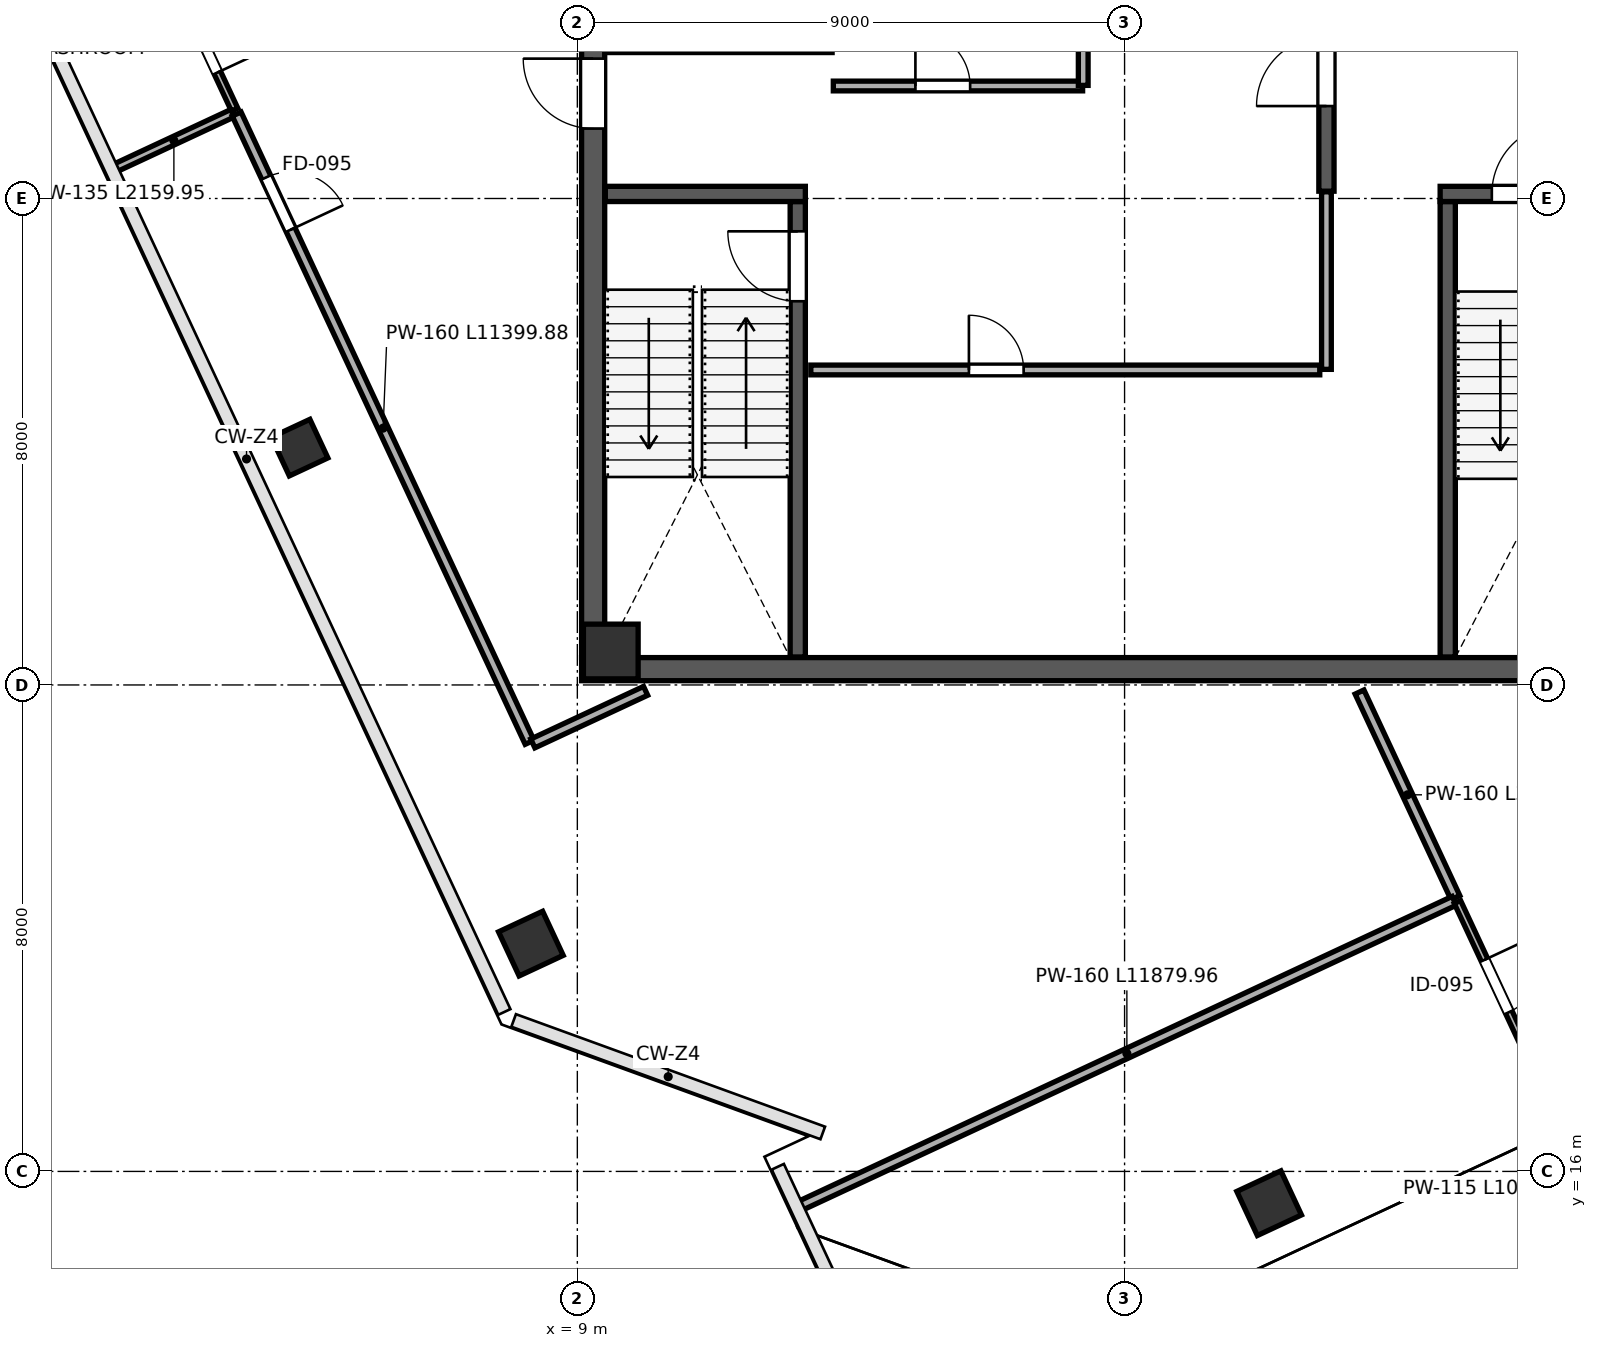
"""IFC4 building model, lengths in metres.
Left out: names, types, materials, properties, quantities, classifications, styles, units other than length and angle.
Written with IfcOpenShell. Run it as: python <this file> out.ifc"""

import sys

from ifc_helpers import new_model, si_unit, direction, frame, frame_2d, origin, origin_2d, place, context, subcontext, project, spatial, rectangle, extrude, source, transform, mapped, element, fill, save


model = new_model("IFC4")
c1 = context("Model", 3, precision=1e-05, world=origin(), true_north=direction((0.0, 1.0)))
c2 = subcontext(c1, "Body", "Model", "MODEL_VIEW")
j1 = project(units=[si_unit("LENGTHUNIT", "METRE"), si_unit("PLANEANGLEUNIT", "RADIAN")], contexts=[c1])
p1 = place(None, origin())
s1 = spatial("IfcSite", under=j1, at=p1, CompositionType="ELEMENT")
p2 = place(p1, origin())
s2 = spatial("IfcBuilding", under=s1, at=p2, CompositionType="ELEMENT")
p3 = place(p2, frame((0.0, 0.0, 340.8)))
s3 = spatial("IfcBuildingStorey", under=s2, at=p3, CompositionType="ELEMENT", Elevation=340.8)
m1 = source(origin(), c2, "Body", "SweptSolid", [
    extrude(rectangle(XDim=0.9, YDim=0.9, at=origin_2d()), origin(), (0.0, 0.0, 1.0), 4.198),
])
p4 = place(p3, frame((9.55, 24.55, 0.001), z_axis=(0.0, 0.0, 1.0), x_axis=(1.0, 0.0, 0.0)))
e1 = element("IfcColumn", 1, at=p4, inside=s3, PredefinedType="COLUMN", context=c2, shape_type="MappedRepresentation", body=[
    mapped(m1, transform((0.0, 0.0, 0.0), scale=1.0)),
])
m2 = source(origin(), c2, "Body", "SweptSolid", [
    extrude(rectangle(XDim=0.7, YDim=0.7, at=origin_2d()), origin(), (0.0, 0.0, 1.0), 4.198),
])
p5 = place(p3, frame((4.432, 27.903, 0.001), z_axis=(0.0, 0.0, 1.0), x_axis=(-0.422618261741, 0.906307787037, 0.0)))
e2 = element("IfcColumn", 2, at=p5, inside=s3, PredefinedType="COLUMN", context=c2, shape_type="MappedRepresentation", body=[
    mapped(m2, transform((0.0, 0.0, 0.0), scale=1.0)),
])
m3 = source(origin(), c2, "Body", "SweptSolid", [
    extrude(rectangle(XDim=0.8, YDim=0.8, at=origin_2d()), origin(), (0.0, 0.0, 1.0), 4.198),
])
for number, where, z_axis, x_axis in (
    (3, (8.236, 19.746, 0.001), (0.0, 0.0, 1.0), (-0.423, 0.906, 0.0)),
    (4, (20.377, 15.478, 0.001), (0.0, 0.0, 1.0), (-0.423, 0.906, 0.0)),
):
    element("IfcColumn", number, at=place(p3, frame(where, z_axis=z_axis, x_axis=x_axis)), inside=s3, PredefinedType="COLUMN", context=c2, shape_type="MappedRepresentation", body=[
        mapped(m3, transform((0.0, 0.0, 0.0), scale=1.0)),
    ])
p6 = place(p3, frame((9.26, 24.45, 0.0), z_axis=(0.0, 0.0, 1.0), x_axis=(0.0, 1.0, 0.0)))
e5 = element("IfcWall", 5, at=p6, inside=s3, PredefinedType="SHEAR", context=c2, shape_type="SweptSolid", body=[
    extrude(rectangle(XDim=15.1, YDim=0.38, at=frame_2d((7.55, 0.0))), origin(), (0.0, 0.0, 1.0), 3.96),
])
p7 = place(p6, frame((8.7, 0.0, 0.0)))
e6 = element("IfcOpeningElement", 6, at=p7, cuts=e5, PredefinedType="OPENING", context=c2, shape_type="SweptSolid", body=[
    extrude(rectangle(XDim=1.15, YDim=2.2, at=frame_2d((0.575, 1.1))), frame((0.0, 0.2, 0.0), z_axis=(0.0, -1.0, 0.0), x_axis=(1.0, 0.0, 0.0)), (0.0, 0.0, 1.0), 0.4),
])
p8 = place(p3, frame((9.07, 24.26, 0.0), z_axis=(0.0, 0.0, 1.0), x_axis=(1.0, 0.0, 0.0)))
e7 = element("IfcWall", 7, at=p8, inside=s3, PredefinedType="SHEAR", context=c2, shape_type="SweptSolid", body=[
    extrude(rectangle(XDim=17.86, YDim=0.38, at=frame_2d((8.93, 0.0))), origin(), (0.0, 0.0, 1.0), 3.96),
])
p9 = place(p3, frame((12.625, 24.46, 0.0), z_axis=(0.0, 0.0, 1.0), x_axis=(0.0, 1.0, 0.0)))
e8 = element("IfcWall", 8, at=p9, inside=s3, PredefinedType="SHEAR", context=c2, shape_type="SweptSolid", body=[
    extrude(rectangle(XDim=7.49, YDim=0.25, at=frame_2d((3.745, 0.0))), origin(), (0.0, 0.0, 1.0), 3.96),
])
p10 = place(p9, frame((5.85, 0.0, 0.0)))
e9 = element("IfcOpeningElement", 9, at=p10, cuts=e8, PredefinedType="OPENING", context=c2, shape_type="SweptSolid", body=[
    extrude(rectangle(XDim=1.15, YDim=2.2, at=frame_2d((0.575, 1.1))), frame((0.0, 0.135, 0.0), z_axis=(0.0, -1.0, 0.0), x_axis=(1.0, 0.0, 0.0)), (0.0, 0.0, 1.0), 0.27),
])
p11 = place(p3, frame((9.46, 32.075, 0.0), z_axis=(0.0, 0.0, 1.0), x_axis=(1.0, 0.0, 0.0)))
e10 = element("IfcWall", 10, at=p11, inside=s3, PredefinedType="SHEAR", context=c2, shape_type="SweptSolid", body=[
    extrude(rectangle(XDim=3.29, YDim=0.25, at=frame_2d((1.645, 0.0))), origin(), (0.0, 0.0, 1.0), 3.96),
])
p12 = place(p3, frame((23.315, 24.46, 0.0), z_axis=(0.0, 0.0, 1.0), x_axis=(0.0, 1.0, 0.0)))
e11 = element("IfcWall", 11, at=p12, inside=s3, PredefinedType="SHEAR", context=c2, shape_type="SweptSolid", body=[
    extrude(rectangle(XDim=7.49, YDim=0.25, at=frame_2d((3.745, 0.0))), origin(), (0.0, 0.0, 1.0), 3.96),
])
p13 = place(p3, frame((23.19, 32.075, 0.0), z_axis=(0.0, 0.0, 1.0), x_axis=(1.0, 0.0, 0.0)))
e12 = element("IfcWall", 12, at=p13, inside=s3, PredefinedType="SHEAR", context=c2, shape_type="SweptSolid", body=[
    extrude(rectangle(XDim=3.35, YDim=0.25, at=frame_2d((1.675, 0.0))), origin(), (0.0, 0.0, 1.0), 3.96),
])
p14 = place(p13, frame((0.85, 0.0, 0.0)))
e13 = element("IfcOpeningElement", 13, at=p14, cuts=e12, PredefinedType="OPENING", context=c2, shape_type="SweptSolid", body=[
    extrude(rectangle(XDim=1.15, YDim=2.2, at=frame_2d((0.575, 1.1))), frame((0.0, 0.135, 0.0), z_axis=(0.0, -1.0, 0.0), x_axis=(1.0, 0.0, 0.0)), (0.0, 0.0, 1.0), 0.27),
])
p15 = place(p3, frame((21.32, 32.12, 0.0), z_axis=(0.0, 0.0, 1.0), x_axis=(0.0, 1.0, 0.0)))
e14 = element("IfcWall", 14, at=p15, inside=s3, PredefinedType="SHEAR", context=c2, shape_type="SweptSolid", body=[
    extrude(rectangle(XDim=7.42, YDim=0.25, at=frame_2d((3.71, 0.0))), origin(), (0.0, 0.0, 1.0), 3.96),
])
p16 = place(p15, frame((1.4, 0.0, 0.0)))
e15 = element("IfcOpeningElement", 15, at=p16, cuts=e14, PredefinedType="OPENING", context=c2, shape_type="SweptSolid", body=[
    extrude(rectangle(XDim=1.15, YDim=2.2, at=frame_2d((0.575, 1.1))), frame((0.0, 0.135, 0.0), z_axis=(0.0, -1.0, 0.0), x_axis=(1.0, 0.0, 0.0)), (0.0, 0.0, 1.0), 0.27),
])
p17 = place(p3, frame((9.49, 34.48, 0.0), z_axis=(0.0, 0.0, 1.0), x_axis=(1.0, 0.0, 0.0)))
e16 = element("IfcWall", 16, at=p17, inside=s3, PredefinedType="PARTITIONING", context=c2, shape_type="SweptSolid", body=[
    extrude(rectangle(XDim=3.7, YDim=0.16, at=frame_2d((1.85, 0.0))), origin(), (0.0, 0.0, 1.0), 3.96),
])
p18 = place(p17, frame((1.15, 0.0, 0.0)))
e17 = element("IfcOpeningElement", 17, at=p18, cuts=e16, PredefinedType="OPENING", context=c2, shape_type="SweptSolid", body=[
    extrude(rectangle(XDim=0.9, YDim=2.15, at=frame_2d((0.45, 1.075))), frame((0.0, 0.09, 0.0), z_axis=(0.0, -1.0, 0.0), x_axis=(1.0, 0.0, 0.0)), (0.0, 0.0, 1.0), 0.18),
])
p19 = place(p3, frame((13.21, 33.85, 0.0), z_axis=(0.0, 0.0, 1.0), x_axis=(1.0, 0.0, 0.0)))
e18 = element("IfcWall", 18, at=p19, inside=s3, PredefinedType="PARTITIONING", context=c2, shape_type="SweptSolid", body=[
    extrude(rectangle(XDim=4.1, YDim=0.16, at=frame_2d((2.05, 0.0))), origin(), (0.0, 0.0, 1.0), 3.96),
])
p20 = place(p19, frame((1.35, 0.0, 0.0)))
e19 = element("IfcOpeningElement", 19, at=p20, cuts=e18, PredefinedType="OPENING", context=c2, shape_type="SweptSolid", body=[
    extrude(rectangle(XDim=0.9, YDim=2.15, at=frame_2d((0.45, 1.075))), frame((0.0, 0.09, 0.0), z_axis=(0.0, -1.0, 0.0), x_axis=(1.0, 0.0, 0.0)), (0.0, 0.0, 1.0), 0.18),
])
p21 = place(p3, frame((17.32, 33.86, 0.0), z_axis=(0.0, 0.0, 1.0), x_axis=(0.0, 1.0, 0.0)))
e20 = element("IfcWall", 20, at=p21, inside=s3, PredefinedType="PARTITIONING", context=c2, shape_type="SweptSolid", body=[
    extrude(rectangle(XDim=1.93, YDim=0.16, at=frame_2d((0.965, 0.0))), origin(), (0.0, 0.0, 1.0), 3.96),
])
p22 = place(p3, frame((12.84, 29.18, 0.0), z_axis=(0.0, 0.0, 1.0), x_axis=(1.0, 0.0, 0.0)))
e21 = element("IfcWall", 21, at=p22, inside=s3, PredefinedType="PARTITIONING", context=c2, shape_type="SweptSolid", body=[
    extrude(rectangle(XDim=8.37, YDim=0.16, at=frame_2d((4.185, 0.0))), origin(), (0.0, 0.0, 1.0), 3.96),
])
p23 = place(p22, frame((2.6, 0.0, 0.0)))
e22 = element("IfcOpeningElement", 22, at=p23, cuts=e21, PredefinedType="OPENING", context=c2, shape_type="SweptSolid", body=[
    extrude(rectangle(XDim=0.9, YDim=2.15, at=frame_2d((0.45, 1.075))), frame((0.0, 0.09, 0.0), z_axis=(0.0, -1.0, 0.0), x_axis=(1.0, 0.0, 0.0)), (0.0, 0.0, 1.0), 0.18),
])
p24 = place(p3, frame((21.32, 29.19, 0.0), z_axis=(0.0, 0.0, 1.0), x_axis=(0.0, 1.0, 0.0)))
e23 = element("IfcWall", 23, at=p24, inside=s3, PredefinedType="PARTITIONING", context=c2, shape_type="SweptSolid", body=[
    extrude(rectangle(XDim=2.92, YDim=0.16, at=frame_2d((1.46, 0.0))), origin(), (0.0, 0.0, 1.0), 3.96),
])
p25 = place(p3, frame((1.386, 32.496, 0.0), z_axis=(0.0, 0.0, 1.0), x_axis=(0.906301500739, 0.422631742487, 0.0)))
e24 = element("IfcWall", 24, at=p25, inside=s3, PredefinedType="PARTITIONING", context=c2, shape_type="SweptSolid", body=[
    extrude(rectangle(XDim=2.16, YDim=0.135, at=frame_2d((1.08, 0.0))), origin(), (0.0, 0.0, 1.0), 3.295),
])
p26 = place(p3, frame((0.383, 39.853, 0.0), z_axis=(0.0, 0.0, 1.0), x_axis=(0.422618208415, -0.906307811903, 0.0)))
e25 = element("IfcWall", 25, at=p26, inside=s3, PredefinedType="PARTITIONING", context=c2, shape_type="SweptSolid", body=[
    extrude(rectangle(XDim=7.052, YDim=0.115, at=frame_2d((3.526, 0.0))), origin(), (0.0, 0.0, 1.0), 3.96),
])
p27 = place(p26, frame((0.8, 0.0, 0.0)))
e26 = element("IfcOpeningElement", 26, at=p27, cuts=e25, PredefinedType="OPENING", context=c2, shape_type="SweptSolid", body=[
    extrude(rectangle(XDim=0.9, YDim=2.15, at=frame_2d((0.45, 1.075))), frame((0.0, 0.067, 0.0), z_axis=(0.0, -1.0, 0.0), x_axis=(1.0, 0.0, 0.0)), (0.0, 0.0, 1.0), 0.135),
])
p28 = place(p26, frame((5.43, 0.0, 0.0)))
e27 = element("IfcOpeningElement", 27, at=p28, cuts=e25, PredefinedType="OPENING", context=c2, shape_type="SweptSolid", body=[
    extrude(rectangle(XDim=0.95, YDim=2.15, at=frame_2d((0.475, 1.075))), frame((0.0, 0.067, 0.0), z_axis=(0.0, -1.0, 0.0), x_axis=(1.0, 0.0, 0.0)), (0.0, 0.0, 1.0), 0.135),
])
p29 = place(p3, frame((3.397, 33.389, 0.0), z_axis=(0.0, 0.0, 1.0), x_axis=(0.422624000171, -0.90630511114, 0.0)))
e28 = element("IfcWall", 28, at=p29, inside=s3, PredefinedType="PARTITIONING", context=c2, shape_type="SweptSolid", body=[
    extrude(rectangle(XDim=11.4, YDim=0.16, at=frame_2d((5.7, 0.0))), origin(), (0.0, 0.0, 1.0), 3.96),
])
p30 = place(p29, frame((1.15, 0.0, 0.0)))
e29 = element("IfcOpeningElement", 29, at=p30, cuts=e28, PredefinedType="OPENING", context=c2, shape_type="SweptSolid", body=[
    extrude(rectangle(XDim=0.95, YDim=2.15, at=frame_2d((0.475, 1.075))), frame((0.0, 0.09, 0.0), z_axis=(0.0, -1.0, 0.0), x_axis=(1.0, 0.0, 0.0)), (0.0, 0.0, 1.0), 0.18),
])
p31 = place(p3, frame((8.268, 23.038, 0.0), z_axis=(0.0, 0.0, 1.0), x_axis=(0.906308042279, 0.422617714371, 0.0)))
e30 = element("IfcWall", 30, at=p31, inside=s3, PredefinedType="PARTITIONING", context=c2, shape_type="SweptSolid", body=[
    extrude(rectangle(XDim=2.047, YDim=0.16, at=frame_2d((1.023, 0.0))), origin(), (0.0, 0.0, 1.0), 3.96),
])
p32 = place(p3, frame((21.864, 23.884, 0.0), z_axis=(0.0, 0.0, 1.0), x_axis=(0.42259522887, -0.906318527085, 0.0)))
e31 = element("IfcWall", 31, at=p32, inside=s3, PredefinedType="PARTITIONING", context=c2, shape_type="SweptSolid", body=[
    extrude(rectangle(XDim=3.73, YDim=0.16, at=frame_2d((1.865, 0.0))), origin(), (0.0, 0.0, 1.0), 3.96),
])
p33 = place(p3, frame((12.654, 15.429, 0.0), z_axis=(0.0, 0.0, 1.0), x_axis=(0.906316447934, 0.42259968789, 0.0)))
e32 = element("IfcWall", 32, at=p33, inside=s3, PredefinedType="PARTITIONING", context=c2, shape_type="SweptSolid", body=[
    extrude(rectangle(XDim=11.88, YDim=0.16, at=frame_2d((5.94, 0.0))), origin(), (0.0, 0.0, 1.0), 3.96),
])
p34 = place(p3, frame((23.475, 20.43, 0.0), z_axis=(0.0, 0.0, 1.0), x_axis=(0.422603997267, -0.906314438533, 0.0)))
e33 = element("IfcWall", 33, at=p34, inside=s3, PredefinedType="PARTITIONING", context=c2, shape_type="SweptSolid", body=[
    extrude(rectangle(XDim=10.4, YDim=0.115, at=frame_2d((5.2, 0.0))), origin(), (0.0, 0.0, 1.0), 3.252),
])
p35 = place(p34, frame((1.05, 0.0, 0.0)))
e34 = element("IfcOpeningElement", 34, at=p35, cuts=e33, PredefinedType="OPENING", context=c2, shape_type="SweptSolid", body=[
    extrude(rectangle(XDim=0.95, YDim=2.15, at=frame_2d((0.475, 1.075))), frame((0.0, 0.067, 0.0), z_axis=(0.0, -1.0, 0.0), x_axis=(1.0, 0.0, 0.0)), (0.0, 0.0, 1.0), 0.135),
])
m4 = source(origin(), c2, "Body", "SweptSolid", [
    extrude(rectangle(XDim=1.15, YDim=2.2, at=frame_2d((0.575, 1.1))), frame((0.0, 0.025, 0.0), z_axis=(0.0, -1.0, 0.0), x_axis=(1.0, 0.0, 0.0)), (0.0, 0.0, 1.0), 0.05),
])
p36 = place(p10, origin())
e35 = element("IfcDoor", 35, at=p36, inside=s3, OperationType="SINGLE_SWING_RIGHT", PredefinedType="DOOR", context=c2, shape_type="MappedRepresentation", body=[
    mapped(m4, transform((0.0, 0.0, 0.0), scale=1.0)),
])
fill(e9, e35)
m5 = source(origin(), c2, "Body", "SweptSolid", [
    extrude(rectangle(XDim=1.15, YDim=2.2, at=frame_2d((0.575, 1.1))), frame((0.0, 0.025, 0.0), z_axis=(0.0, -1.0, 0.0), x_axis=(1.0, 0.0, 0.0)), (0.0, 0.0, 1.0), 0.05),
])
p37 = place(p16, origin())
e36 = element("IfcDoor", 36, at=p37, inside=s3, OperationType="SINGLE_SWING_LEFT", PredefinedType="DOOR", context=c2, shape_type="MappedRepresentation", body=[
    mapped(m5, transform((0.0, 0.0, 0.0), scale=1.0)),
])
fill(e15, e36)
p38 = place(p14, origin())
e37 = element("IfcDoor", 37, at=p38, inside=s3, OperationType="SINGLE_SWING_RIGHT", PredefinedType="DOOR", context=c2, shape_type="MappedRepresentation", body=[
    mapped(m4, transform((0.0, 0.0, 0.0), scale=1.0)),
])
fill(e13, e37)
p39 = place(p7, origin())
e38 = element("IfcDoor", 38, at=p39, inside=s3, OperationType="SINGLE_SWING_RIGHT", PredefinedType="DOOR", context=c2, shape_type="MappedRepresentation", body=[
    mapped(m5, transform((0.0, 0.0, 0.0), scale=1.0)),
])
fill(e6, e38)
m6 = source(origin(), c2, "Body", "SweptSolid", [
    extrude(rectangle(XDim=0.9, YDim=2.15, at=frame_2d((0.45, 1.075))), frame((0.0, 0.025, 0.0), z_axis=(0.0, -1.0, 0.0), x_axis=(1.0, 0.0, 0.0)), (0.0, 0.0, 1.0), 0.05),
])
p40 = place(p20, origin())
e39 = element("IfcDoor", 39, at=p40, inside=s3, OperationType="SINGLE_SWING_LEFT", PredefinedType="DOOR", context=c2, shape_type="MappedRepresentation", body=[
    mapped(m6, transform((0.0, 0.0, 0.0), scale=1.0)),
])
fill(e19, e39)
p41 = place(p23, origin())
e40 = element("IfcDoor", 40, at=p41, inside=s3, OperationType="SINGLE_SWING_LEFT", PredefinedType="DOOR", context=c2, shape_type="MappedRepresentation", body=[
    mapped(m6, transform((0.0, 0.0, 0.0), scale=1.0)),
])
fill(e22, e40)
m7 = source(origin(), c2, "Body", "SweptSolid", [
    extrude(rectangle(XDim=0.95, YDim=2.15, at=frame_2d((0.475, 1.075))), frame((0.0, 0.025, 0.0), z_axis=(0.0, -1.0, 0.0), x_axis=(1.0, 0.0, 0.0)), (0.0, 0.0, 1.0), 0.05),
])
p42 = place(p28, origin())
e41 = element("IfcDoor", 41, at=p42, inside=s3, OperationType="SINGLE_SWING_RIGHT", PredefinedType="DOOR", context=c2, shape_type="MappedRepresentation", body=[
    mapped(m7, transform((0.0, 0.0, 0.0), scale=1.0)),
])
fill(e27, e41)
m8 = source(origin(), c2, "Body", "SweptSolid", [
    extrude(rectangle(XDim=0.95, YDim=2.15, at=frame_2d((0.475, 1.075))), frame((0.0, 0.025, 0.0), z_axis=(0.0, -1.0, 0.0), x_axis=(1.0, 0.0, 0.0)), (0.0, 0.0, 1.0), 0.05),
])
p43 = place(p30, origin())
e42 = element("IfcDoor", 42, at=p43, inside=s3, OperationType="SINGLE_SWING_RIGHT", PredefinedType="DOOR", context=c2, shape_type="MappedRepresentation", body=[
    mapped(m8, transform((0.0, 0.0, 0.0), scale=1.0)),
])
fill(e29, e42)
p44 = place(p35, origin())
e43 = element("IfcDoor", 43, at=p44, inside=s3, OperationType="SINGLE_SWING_LEFT", PredefinedType="DOOR", context=c2, shape_type="MappedRepresentation", body=[
    mapped(m7, transform((0.0, 0.0, 0.0), scale=1.0)),
])
fill(e34, e43)
save(model, sys.argv[1])
